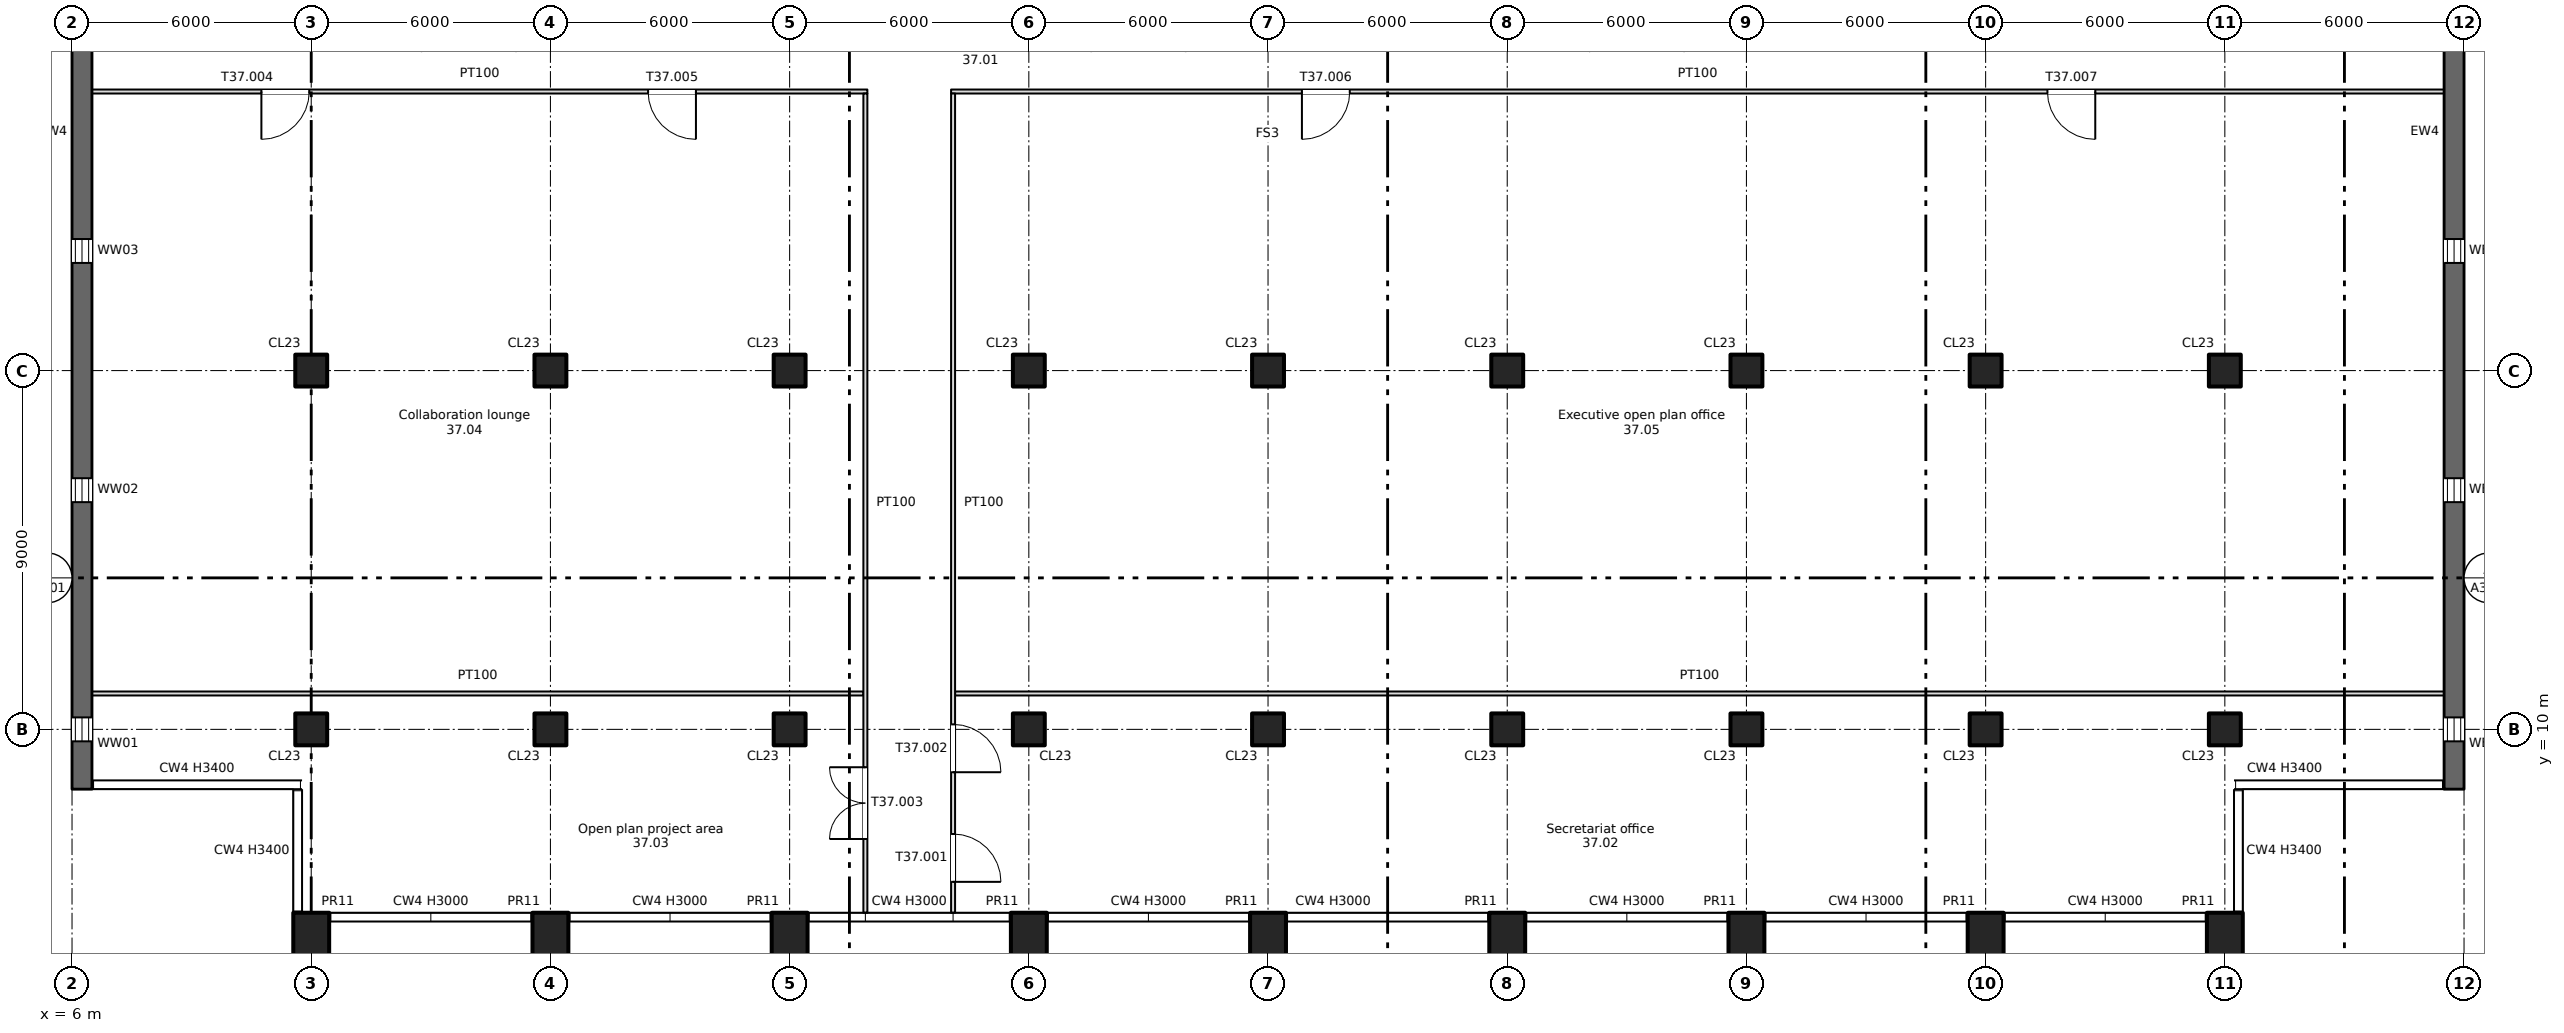
"""IFC4 building model, lengths in metres.
Left out: names, types, materials, properties, quantities, classifications, styles, units other than length and angle.
Written with IfcOpenShell. Run it as: python <this file> out.ifc"""

import sys

from ifc_helpers import new_model, si_unit, direction, frame, frame_2d, origin, origin_2d, place, context, subcontext, project, spatial, rectangle, extrude, element, fill, save


model = new_model("IFC4")
c1 = context("Model", 3, precision=1e-05, world=origin(), true_north=direction((0.0, 1.0)))
c2 = subcontext(c1, "Body", "Model", "MODEL_VIEW")
j1 = project(units=[si_unit("LENGTHUNIT", "METRE"), si_unit("PLANEANGLEUNIT", "RADIAN")], contexts=[c1])
p1 = place(None, origin())
s1 = spatial("IfcSite", under=j1, at=p1, CompositionType="ELEMENT")
p2 = place(p1, origin())
s2 = spatial("IfcBuilding", under=s1, at=p2, CompositionType="ELEMENT")
p3 = place(p2, frame((0.0, 0.0, 258.35)))
s3 = spatial("IfcBuildingStorey", under=s2, at=p3, CompositionType="ELEMENT", Elevation=258.35)
for number, where, z_axis, x_axis in (
    (1, (12.0, 4.7, -0.4), (0.0, 0.0, 1.0), (1.0, 0.0, 0.0)),
    (2, (18.0, 4.7, -0.4), (0.0, 0.0, 1.0), (1.0, 0.0, 0.0)),
    (3, (24.0, 4.7, -0.4), (0.0, 0.0, 1.0), (1.0, 0.0, 0.0)),
    (4, (30.0, 4.7, -0.4), (0.0, 0.0, 1.0), (1.0, 0.0, 0.0)),
    (5, (36.0, 4.7, -0.4), (0.0, 0.0, 1.0), (1.0, 0.0, 0.0)),
    (6, (42.0, 4.7, -0.4), (0.0, 0.0, 1.0), (1.0, 0.0, 0.0)),
    (7, (48.0, 4.7, -0.4), (0.0, 0.0, 1.0), (1.0, 0.0, 0.0)),
    (8, (54.0, 4.7, -0.4), (0.0, 0.0, 1.0), (1.0, 0.0, 0.0)),
    (9, (60.0, 4.7, -0.4), (0.0, 0.0, 1.0), (1.0, 0.0, 0.0)),
):
    element("IfcColumn", number, at=place(p3, frame(where, z_axis=z_axis, x_axis=x_axis)), inside=s3, PredefinedType="COLUMN", context=c2, shape_type="SweptSolid", body=[
        extrude(rectangle(XDim=0.9, YDim=1.4, at=origin_2d()), origin(), (0.0, 0.0, 1.0), 3.8),
    ])
for number, where, z_axis, x_axis in (
    (10, (12.0, 10.0, 0.0), (0.0, 0.0, 1.0), (1.0, 0.0, 0.0)),
    (11, (12.0, 19.0, 0.0), (0.0, 0.0, 1.0), (1.0, 0.0, 0.0)),
    (12, (18.0, 10.0, 0.0), (0.0, 0.0, 1.0), (1.0, 0.0, 0.0)),
    (13, (18.0, 19.0, 0.0), (0.0, 0.0, 1.0), (1.0, 0.0, 0.0)),
    (14, (24.0, 10.0, 0.0), (0.0, 0.0, 1.0), (1.0, 0.0, 0.0)),
    (15, (24.0, 19.0, 0.0), (0.0, 0.0, 1.0), (1.0, 0.0, 0.0)),
    (16, (30.0, 10.0, 0.0), (0.0, 0.0, 1.0), (1.0, 0.0, 0.0)),
    (17, (30.0, 19.0, 0.0), (0.0, 0.0, 1.0), (1.0, 0.0, 0.0)),
    (18, (36.0, 10.0, 0.0), (0.0, 0.0, 1.0), (1.0, 0.0, 0.0)),
    (19, (36.0, 19.0, 0.0), (0.0, 0.0, 1.0), (1.0, 0.0, 0.0)),
    (20, (42.0, 10.0, 0.0), (0.0, 0.0, 1.0), (1.0, 0.0, 0.0)),
    (21, (42.0, 19.0, 0.0), (0.0, 0.0, 1.0), (1.0, 0.0, 0.0)),
    (22, (48.0, 10.0, 0.0), (0.0, 0.0, 1.0), (1.0, 0.0, 0.0)),
    (23, (48.0, 19.0, 0.0), (0.0, 0.0, 1.0), (1.0, 0.0, 0.0)),
    (24, (54.0, 10.0, 0.0), (0.0, 0.0, 1.0), (1.0, 0.0, 0.0)),
    (25, (54.0, 19.0, 0.0), (0.0, 0.0, 1.0), (1.0, 0.0, 0.0)),
    (26, (60.0, 10.0, 0.0), (0.0, 0.0, 1.0), (1.0, 0.0, 0.0)),
    (27, (60.0, 19.0, 0.0), (0.0, 0.0, 1.0), (1.0, 0.0, 0.0)),
):
    element("IfcColumn", number, at=place(p3, frame(where, z_axis=z_axis, x_axis=x_axis)), inside=s3, PredefinedType="COLUMN", context=c2, shape_type="SweptSolid", body=[
        extrude(rectangle(XDim=0.8, YDim=0.8, at=origin_2d()), origin(), (0.0, 0.0, 1.0), 3.4),
    ])
p4 = place(p3, frame((6.25, 8.5, 0.0), z_axis=(0.0, 0.0, 1.0), x_axis=(0.0, 1.0, 0.0)))
e28 = element("IfcWall", 28, at=p4, inside=s3, PredefinedType="SHEAR", context=c2, shape_type="SweptSolid", body=[
    extrude(rectangle(XDim=33.0, YDim=0.5, at=frame_2d((16.5, 0.0))), origin(), (0.0, 0.0, 1.0), 3.4),
])
p5 = place(p4, frame((1.2, 0.0, 0.6)))
e29 = element("IfcOpeningElement", 29, at=p5, cuts=e28, PredefinedType="OPENING", context=c2, shape_type="SweptSolid", body=[
    extrude(rectangle(XDim=0.6, YDim=2.4, at=frame_2d((0.3, 1.2))), frame((0.0, 0.26, 0.0), z_axis=(0.0, -1.0, 0.0), x_axis=(1.0, 0.0, 0.0)), (0.0, 0.0, 1.0), 0.52),
])
p6 = place(p4, frame((7.2, 0.0, 0.6)))
e30 = element("IfcOpeningElement", 30, at=p6, cuts=e28, PredefinedType="OPENING", context=c2, shape_type="SweptSolid", body=[
    extrude(rectangle(XDim=0.6, YDim=2.4, at=frame_2d((0.3, 1.2))), frame((0.0, 0.26, 0.0), z_axis=(0.0, -1.0, 0.0), x_axis=(1.0, 0.0, 0.0)), (0.0, 0.0, 1.0), 0.52),
])
p7 = place(p4, frame((13.2, 0.0, 0.6)))
e31 = element("IfcOpeningElement", 31, at=p7, cuts=e28, PredefinedType="OPENING", context=c2, shape_type="SweptSolid", body=[
    extrude(rectangle(XDim=0.6, YDim=2.4, at=frame_2d((0.3, 1.2))), frame((0.0, 0.26, 0.0), z_axis=(0.0, -1.0, 0.0), x_axis=(1.0, 0.0, 0.0)), (0.0, 0.0, 1.0), 0.52),
])
p8 = place(p3, frame((65.75, 8.5, 0.0), z_axis=(0.0, 0.0, 1.0), x_axis=(0.0, 1.0, 0.0)))
e32 = element("IfcWall", 32, at=p8, inside=s3, PredefinedType="SHEAR", context=c2, shape_type="SweptSolid", body=[
    extrude(rectangle(XDim=33.0, YDim=0.5, at=frame_2d((16.5, 0.0))), origin(), (0.0, 0.0, 1.0), 3.4),
])
p9 = place(p8, frame((1.2, 0.0, 0.6)))
e33 = element("IfcOpeningElement", 33, at=p9, cuts=e32, PredefinedType="OPENING", context=c2, shape_type="SweptSolid", body=[
    extrude(rectangle(XDim=0.6, YDim=2.4, at=frame_2d((0.3, 1.2))), frame((0.0, 0.26, 0.0), z_axis=(0.0, -1.0, 0.0), x_axis=(1.0, 0.0, 0.0)), (0.0, 0.0, 1.0), 0.52),
])
p10 = place(p8, frame((7.2, 0.0, 0.6)))
e34 = element("IfcOpeningElement", 34, at=p10, cuts=e32, PredefinedType="OPENING", context=c2, shape_type="SweptSolid", body=[
    extrude(rectangle(XDim=0.6, YDim=2.4, at=frame_2d((0.3, 1.2))), frame((0.0, 0.26, 0.0), z_axis=(0.0, -1.0, 0.0), x_axis=(1.0, 0.0, 0.0)), (0.0, 0.0, 1.0), 0.52),
])
p11 = place(p8, frame((13.2, 0.0, 0.6)))
e35 = element("IfcOpeningElement", 35, at=p11, cuts=e32, PredefinedType="OPENING", context=c2, shape_type="SweptSolid", body=[
    extrude(rectangle(XDim=0.6, YDim=2.4, at=frame_2d((0.3, 1.2))), frame((0.0, 0.26, 0.0), z_axis=(0.0, -1.0, 0.0), x_axis=(1.0, 0.0, 0.0)), (0.0, 0.0, 1.0), 0.52),
])
p12 = place(p3, frame((6.5, 10.9, 0.0), z_axis=(0.0, 0.0, 1.0), x_axis=(1.0, 0.0, 0.0)))
e36 = element("IfcWall", 36, at=p12, inside=s3, PredefinedType="PARTITIONING", context=c2, shape_type="SweptSolid", body=[
    extrude(rectangle(XDim=19.35, YDim=0.1, at=frame_2d((9.675, 0.0))), origin(), (0.0, 0.0, 1.0), 3.4),
])
p13 = place(p3, frame((28.15, 10.9, 0.0), z_axis=(0.0, 0.0, 1.0), x_axis=(1.0, 0.0, 0.0)))
e37 = element("IfcWall", 37, at=p13, inside=s3, PredefinedType="PARTITIONING", context=c2, shape_type="SweptSolid", body=[
    extrude(rectangle(XDim=37.35, YDim=0.1, at=frame_2d((18.675, 0.0))), origin(), (0.0, 0.0, 1.0), 3.4),
])
p14 = place(p3, frame((6.5, 26.0, 0.0), z_axis=(0.0, 0.0, 1.0), x_axis=(1.0, 0.0, 0.0)))
e38 = element("IfcWall", 38, at=p14, inside=s3, PredefinedType="PARTITIONING", context=c2, shape_type="SweptSolid", body=[
    extrude(rectangle(XDim=19.45, YDim=0.1, at=frame_2d((9.725, 0.0))), origin(), (0.0, 0.0, 1.0), 3.4),
])
p15 = place(p14, frame((4.25, 0.0, 0.0)))
e39 = element("IfcOpeningElement", 39, at=p15, cuts=e38, PredefinedType="OPENING", context=c2, shape_type="SweptSolid", body=[
    extrude(rectangle(XDim=1.2, YDim=2.1, at=frame_2d((0.6, 1.05))), frame((0.0, 0.06, 0.0), z_axis=(0.0, -1.0, 0.0), x_axis=(1.0, 0.0, 0.0)), (0.0, 0.0, 1.0), 0.12),
])
p16 = place(p14, frame((13.95, 0.0, 0.0)))
e40 = element("IfcOpeningElement", 40, at=p16, cuts=e38, PredefinedType="OPENING", context=c2, shape_type="SweptSolid", body=[
    extrude(rectangle(XDim=1.2, YDim=2.1, at=frame_2d((0.6, 1.05))), frame((0.0, 0.06, 0.0), z_axis=(0.0, -1.0, 0.0), x_axis=(1.0, 0.0, 0.0)), (0.0, 0.0, 1.0), 0.12),
])
p17 = place(p3, frame((28.05, 26.0, 0.0), z_axis=(0.0, 0.0, 1.0), x_axis=(1.0, 0.0, 0.0)))
e41 = element("IfcWall", 41, at=p17, inside=s3, PredefinedType="PARTITIONING", context=c2, shape_type="SweptSolid", body=[
    extrude(rectangle(XDim=37.45, YDim=0.1, at=frame_2d((18.725, 0.0))), origin(), (0.0, 0.0, 1.0), 3.4),
])
p18 = place(p17, frame((8.8, 0.0, 0.0)))
e42 = element("IfcOpeningElement", 42, at=p18, cuts=e41, PredefinedType="OPENING", context=c2, shape_type="SweptSolid", body=[
    extrude(rectangle(XDim=1.2, YDim=2.1, at=frame_2d((0.6, 1.05))), frame((0.0, 0.06, 0.0), z_axis=(0.0, -1.0, 0.0), x_axis=(1.0, 0.0, 0.0)), (0.0, 0.0, 1.0), 0.12),
])
p19 = place(p17, frame((27.5, 0.0, 0.0)))
e43 = element("IfcOpeningElement", 43, at=p19, cuts=e41, PredefinedType="OPENING", context=c2, shape_type="SweptSolid", body=[
    extrude(rectangle(XDim=1.2, YDim=2.1, at=frame_2d((0.6, 1.05))), frame((0.0, 0.06, 0.0), z_axis=(0.0, -1.0, 0.0), x_axis=(1.0, 0.0, 0.0)), (0.0, 0.0, 1.0), 0.12),
])
p20 = place(p3, frame((25.9, 5.4, 0.0), z_axis=(0.0, 0.0, 1.0), x_axis=(0.0, 1.0, 0.0)))
e44 = element("IfcWall", 44, at=p20, inside=s3, PredefinedType="PARTITIONING", context=c2, shape_type="SweptSolid", body=[
    extrude(rectangle(XDim=20.55, YDim=0.1, at=frame_2d((10.275, 0.0))), origin(), (0.0, 0.0, 1.0), 3.4),
])
p21 = place(p20, frame((1.85, 0.0, 0.0)))
e45 = element("IfcOpeningElement", 45, at=p21, cuts=e44, PredefinedType="OPENING", context=c2, shape_type="SweptSolid", body=[
    extrude(rectangle(XDim=1.8, YDim=2.1, at=frame_2d((0.9, 1.05))), frame((0.0, 0.06, 0.0), z_axis=(0.0, -1.0, 0.0), x_axis=(1.0, 0.0, 0.0)), (0.0, 0.0, 1.0), 0.12),
])
p22 = place(p3, frame((28.1, 5.4, 0.0), z_axis=(0.0, 0.0, 1.0), x_axis=(0.0, 1.0, 0.0)))
e46 = element("IfcWall", 46, at=p22, inside=s3, PredefinedType="PARTITIONING", context=c2, shape_type="SweptSolid", body=[
    extrude(rectangle(XDim=20.55, YDim=0.1, at=frame_2d((10.275, 0.0))), origin(), (0.0, 0.0, 1.0), 3.4),
])
p23 = place(p22, frame((0.775, 0.0, 0.0)))
e47 = element("IfcOpeningElement", 47, at=p23, cuts=e46, PredefinedType="OPENING", context=c2, shape_type="SweptSolid", body=[
    extrude(rectangle(XDim=1.2, YDim=2.1, at=frame_2d((0.6, 1.05))), frame((0.0, 0.06, 0.0), z_axis=(0.0, -1.0, 0.0), x_axis=(1.0, 0.0, 0.0)), (0.0, 0.0, 1.0), 0.12),
])
p24 = place(p22, frame((3.525, 0.0, 0.0)))
e48 = element("IfcOpeningElement", 48, at=p24, cuts=e46, PredefinedType="OPENING", context=c2, shape_type="SweptSolid", body=[
    extrude(rectangle(XDim=1.2, YDim=2.1, at=frame_2d((0.6, 1.05))), frame((0.0, 0.06, 0.0), z_axis=(0.0, -1.0, 0.0), x_axis=(1.0, 0.0, 0.0)), (0.0, 0.0, 1.0), 0.12),
])
p25 = place(p5, origin())
e49 = element("IfcWindow", 49, at=p25, inside=s3, PartitioningType="SINGLE_PANEL", PredefinedType="WINDOW", context=c2, shape_type="SweptSolid", body=[
    extrude(rectangle(XDim=0.6, YDim=2.4, at=frame_2d((0.3, 1.2))), frame((0.0, 0.03, 0.0), z_axis=(0.0, -1.0, 0.0), x_axis=(1.0, 0.0, 0.0)), (0.0, 0.0, 1.0), 0.06),
])
fill(e29, e49)
p26 = place(p6, origin())
e50 = element("IfcWindow", 50, at=p26, inside=s3, PartitioningType="SINGLE_PANEL", PredefinedType="WINDOW", context=c2, shape_type="SweptSolid", body=[
    extrude(rectangle(XDim=0.6, YDim=2.4, at=frame_2d((0.3, 1.2))), frame((0.0, 0.03, 0.0), z_axis=(0.0, -1.0, 0.0), x_axis=(1.0, 0.0, 0.0)), (0.0, 0.0, 1.0), 0.06),
])
fill(e30, e50)
p27 = place(p7, origin())
e51 = element("IfcWindow", 51, at=p27, inside=s3, PartitioningType="SINGLE_PANEL", PredefinedType="WINDOW", context=c2, shape_type="SweptSolid", body=[
    extrude(rectangle(XDim=0.6, YDim=2.4, at=frame_2d((0.3, 1.2))), frame((0.0, 0.03, 0.0), z_axis=(0.0, -1.0, 0.0), x_axis=(1.0, 0.0, 0.0)), (0.0, 0.0, 1.0), 0.06),
])
fill(e31, e51)
p28 = place(p9, origin())
e52 = element("IfcWindow", 52, at=p28, inside=s3, PartitioningType="SINGLE_PANEL", PredefinedType="WINDOW", context=c2, shape_type="SweptSolid", body=[
    extrude(rectangle(XDim=0.6, YDim=2.4, at=frame_2d((0.3, 1.2))), frame((0.0, 0.03, 0.0), z_axis=(0.0, -1.0, 0.0), x_axis=(1.0, 0.0, 0.0)), (0.0, 0.0, 1.0), 0.06),
])
fill(e33, e52)
p29 = place(p10, origin())
e53 = element("IfcWindow", 53, at=p29, inside=s3, PartitioningType="SINGLE_PANEL", PredefinedType="WINDOW", context=c2, shape_type="SweptSolid", body=[
    extrude(rectangle(XDim=0.6, YDim=2.4, at=frame_2d((0.3, 1.2))), frame((0.0, 0.03, 0.0), z_axis=(0.0, -1.0, 0.0), x_axis=(1.0, 0.0, 0.0)), (0.0, 0.0, 1.0), 0.06),
])
fill(e34, e53)
p30 = place(p11, origin())
e54 = element("IfcWindow", 54, at=p30, inside=s3, PartitioningType="SINGLE_PANEL", PredefinedType="WINDOW", context=c2, shape_type="SweptSolid", body=[
    extrude(rectangle(XDim=0.6, YDim=2.4, at=frame_2d((0.3, 1.2))), frame((0.0, 0.03, 0.0), z_axis=(0.0, -1.0, 0.0), x_axis=(1.0, 0.0, 0.0)), (0.0, 0.0, 1.0), 0.06),
])
fill(e35, e54)
p31 = place(p23, origin())
e55 = element("IfcDoor", 55, at=p31, inside=s3, OperationType="SINGLE_SWING_LEFT", PredefinedType="DOOR", context=c2, shape_type="SweptSolid", body=[
    extrude(rectangle(XDim=1.2, YDim=2.1, at=frame_2d((0.6, 1.05))), frame((0.0, 0.025, 0.0), z_axis=(0.0, -1.0, 0.0), x_axis=(1.0, 0.0, 0.0)), (0.0, 0.0, 1.0), 0.05),
])
fill(e47, e55)
p32 = place(p24, origin())
e56 = element("IfcDoor", 56, at=p32, inside=s3, OperationType="SINGLE_SWING_LEFT", PredefinedType="DOOR", context=c2, shape_type="SweptSolid", body=[
    extrude(rectangle(XDim=1.2, YDim=2.1, at=frame_2d((0.6, 1.05))), frame((0.0, 0.025, 0.0), z_axis=(0.0, -1.0, 0.0), x_axis=(1.0, 0.0, 0.0)), (0.0, 0.0, 1.0), 0.05),
])
fill(e48, e56)
p33 = place(p21, origin())
e57 = element("IfcDoor", 57, at=p33, inside=s3, OperationType="DOUBLE_DOOR_SINGLE_SWING", PredefinedType="DOOR", context=c2, shape_type="SweptSolid", body=[
    extrude(rectangle(XDim=1.8, YDim=2.1, at=frame_2d((0.9, 1.05))), frame((0.0, 0.025, 0.0), z_axis=(0.0, -1.0, 0.0), x_axis=(1.0, 0.0, 0.0)), (0.0, 0.0, 1.0), 0.05),
])
fill(e45, e57)
p34 = place(p15, origin())
e58 = element("IfcDoor", 58, at=p34, inside=s3, OperationType="SINGLE_SWING_LEFT", PredefinedType="DOOR", context=c2, shape_type="SweptSolid", body=[
    extrude(rectangle(XDim=1.2, YDim=2.1, at=frame_2d((0.6, 1.05))), frame((0.0, 0.025, 0.0), z_axis=(0.0, -1.0, 0.0), x_axis=(1.0, 0.0, 0.0)), (0.0, 0.0, 1.0), 0.05),
])
fill(e39, e58)
p35 = place(p16, origin())
e59 = element("IfcDoor", 59, at=p35, inside=s3, OperationType="SINGLE_SWING_RIGHT", PredefinedType="DOOR", context=c2, shape_type="SweptSolid", body=[
    extrude(rectangle(XDim=1.2, YDim=2.1, at=frame_2d((0.6, 1.05))), frame((0.0, 0.025, 0.0), z_axis=(0.0, -1.0, 0.0), x_axis=(1.0, 0.0, 0.0)), (0.0, 0.0, 1.0), 0.05),
])
fill(e40, e59)
p36 = place(p18, origin())
e60 = element("IfcDoor", 60, at=p36, inside=s3, OperationType="SINGLE_SWING_LEFT", PredefinedType="DOOR", context=c2, shape_type="SweptSolid", body=[
    extrude(rectangle(XDim=1.2, YDim=2.1, at=frame_2d((0.6, 1.05))), frame((0.0, 0.025, 0.0), z_axis=(0.0, -1.0, 0.0), x_axis=(1.0, 0.0, 0.0)), (0.0, 0.0, 1.0), 0.05),
])
fill(e42, e60)
p37 = place(p19, origin())
e61 = element("IfcDoor", 61, at=p37, inside=s3, OperationType="SINGLE_SWING_RIGHT", PredefinedType="DOOR", context=c2, shape_type="SweptSolid", body=[
    extrude(rectangle(XDim=1.2, YDim=2.1, at=frame_2d((0.6, 1.05))), frame((0.0, 0.025, 0.0), z_axis=(0.0, -1.0, 0.0), x_axis=(1.0, 0.0, 0.0)), (0.0, 0.0, 1.0), 0.05),
])
fill(e43, e61)
save(model, sys.argv[1])
